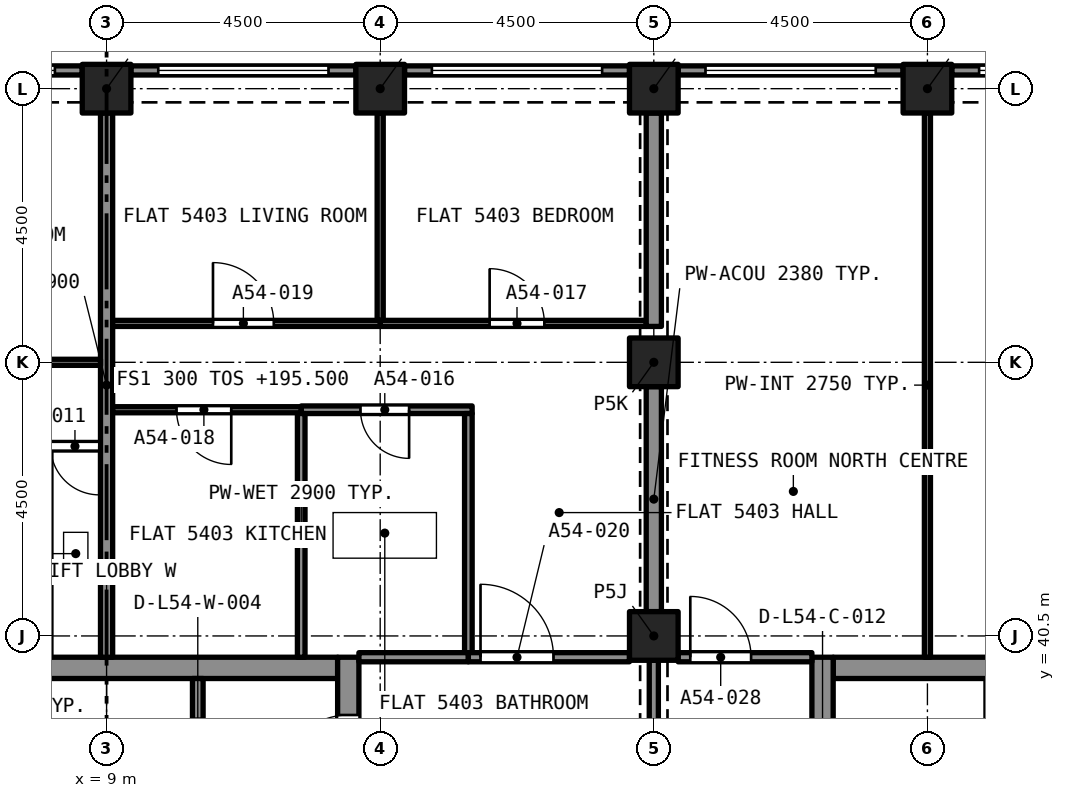
"""IFC4 building model, lengths in metres.
Left out: names, types, materials, properties, quantities, classifications, styles, units other than length and angle.
Written with IfcOpenShell. Run it as: python <this file> out.ifc"""

import sys

from ifc_helpers import new_model, si_unit, direction, frame, frame_2d, origin, origin_2d, place, context, subcontext, project, spatial, rectangle, extrude, element, fill, save


model = new_model("IFC4")
c1 = context("Model", 3, precision=1e-05, world=origin(), true_north=direction((0.0, 1.0)))
c2 = subcontext(c1, "Body", "Model", "MODEL_VIEW")
j1 = project(units=[si_unit("LENGTHUNIT", "METRE"), si_unit("PLANEANGLEUNIT", "RADIAN")], contexts=[c1])
p1 = place(None, origin())
s1 = spatial("IfcSite", under=j1, at=p1, CompositionType="ELEMENT")
p2 = place(p1, origin())
s2 = spatial("IfcBuilding", under=s1, at=p2, CompositionType="ELEMENT")
p3 = place(p2, frame((0.0, 0.0, 195.5)))
s3 = spatial("IfcBuildingStorey", under=s2, at=p3, CompositionType="ELEMENT", Elevation=195.5)
for number, where, z_axis, x_axis in (
    (1, (18.0, 40.5, 0.0), (0.0, 0.0, 1.0), (1.0, 0.0, 0.0)),
    (2, (18.0, 45.0, 0.0), (0.0, 0.0, 1.0), (1.0, 0.0, 0.0)),
    (3, (9.0, 49.5, 0.0), (0.0, 0.0, 1.0), (1.0, 0.0, 0.0)),
    (4, (13.5, 49.5, 0.0), (0.0, 0.0, 1.0), (1.0, 0.0, 0.0)),
    (5, (18.0, 49.5, 0.0), (0.0, 0.0, 1.0), (1.0, 0.0, 0.0)),
    (6, (22.5, 49.5, 0.0), (0.0, 0.0, 1.0), (1.0, 0.0, 0.0)),
):
    element("IfcColumn", number, at=place(p3, frame(where, z_axis=z_axis, x_axis=x_axis)), inside=s3, PredefinedType="COLUMN", context=c2, shape_type="SweptSolid", body=[
        extrude(rectangle(XDim=0.8, YDim=0.8, at=origin_2d()), origin(), (0.0, 0.0, 1.0), 3.2),
    ])
p4 = place(p3, frame((5.2, 39.975, 0.0), z_axis=(0.0, 0.0, 1.0), x_axis=(1.0, 0.0, 0.0)))
e7 = element("IfcWall", 7, at=p4, inside=s3, PredefinedType="SOLIDWALL", context=c2, shape_type="SweptSolid", body=[
    extrude(rectangle(XDim=7.6, YDim=0.35, at=frame_2d((3.8, 0.0))), origin(), (0.0, 0.0, 1.0), 3.2),
])
p5 = place(p3, frame((12.975, 27.35, 0.0), z_axis=(0.0, 0.0, 1.0), x_axis=(0.0, 1.0, 0.0)))
e8 = element("IfcWall", 8, at=p5, inside=s3, PredefinedType="SOLIDWALL", context=c2, shape_type="SweptSolid", body=[
    extrude(rectangle(XDim=12.8, YDim=0.35, at=frame_2d((6.4, 0.0))), origin(), (0.0, 0.0, 1.0), 3.2),
])
p6 = place(p5, frame((10.75, 0.0, 0.0)))
e9 = element("IfcOpeningElement", 9, at=p6, cuts=e8, PredefinedType="OPENING", context=c2, shape_type="SweptSolid", body=[
    extrude(rectangle(XDim=1.1, YDim=2.1, at=frame_2d((0.55, 1.05))), frame((0.0, 0.185, 0.0), z_axis=(0.0, -1.0, 0.0), x_axis=(1.0, 0.0, 0.0)), (0.0, 0.0, 1.0), 0.37),
])
p7 = place(p5, frame((8.6, 0.0, 0.0)))
e10 = element("IfcOpeningElement", 10, at=p7, cuts=e8, PredefinedType="OPENING", context=c2, shape_type="SweptSolid", body=[
    extrude(rectangle(XDim=1.2, YDim=2.1, at=frame_2d((0.6, 1.05))), frame((0.0, 0.185, 0.0), z_axis=(0.0, -1.0, 0.0), x_axis=(1.0, 0.0, 0.0)), (0.0, 0.0, 1.0), 0.37),
])
p8 = place(p3, frame((20.95, 39.975, 0.0), z_axis=(0.0, 0.0, 1.0), x_axis=(1.0, 0.0, 0.0)))
e11 = element("IfcWall", 11, at=p8, inside=s3, PredefinedType="SOLIDWALL", context=c2, shape_type="SweptSolid", body=[
    extrude(rectangle(XDim=7.6, YDim=0.35, at=frame_2d((3.8, 0.0))), origin(), (0.0, 0.0, 1.0), 3.2),
])
p9 = place(p3, frame((20.775, 27.35, 0.0), z_axis=(0.0, 0.0, 1.0), x_axis=(0.0, 1.0, 0.0)))
e12 = element("IfcWall", 12, at=p9, inside=s3, PredefinedType="SOLIDWALL", context=c2, shape_type="SweptSolid", body=[
    extrude(rectangle(XDim=12.8, YDim=0.35, at=frame_2d((6.4, 0.0))), origin(), (0.0, 0.0, 1.0), 3.2),
])
p10 = place(p9, frame((8.6, 0.0, 0.0)))
e13 = element("IfcOpeningElement", 13, at=p10, cuts=e12, PredefinedType="OPENING", context=c2, shape_type="SweptSolid", body=[
    extrude(rectangle(XDim=1.2, YDim=2.1, at=frame_2d((0.6, 1.05))), frame((0.0, 0.185, 0.0), z_axis=(0.0, -1.0, 0.0), x_axis=(1.0, 0.0, 0.0)), (0.0, 0.0, 1.0), 0.37),
])
p11 = place(p3, frame((22.9, 49.8, 0.0), z_axis=(0.0, 0.0, 1.0), x_axis=(1.0, 0.0, 0.0)))
e14 = element("IfcWall", 14, at=p11, inside=s3, PredefinedType="SOLIDWALL", context=c2, shape_type="SweptSolid", body=[
    extrude(rectangle(XDim=3.7, YDim=0.15, at=frame_2d((1.85, 0.0))), origin(), (0.0, 0.0, 1.0), 3.2),
])
p12 = place(p11, frame((0.45, 0.0, 0.45)))
e15 = element("IfcOpeningElement", 15, at=p12, cuts=e14, PredefinedType="OPENING", context=c2, shape_type="SweptSolid", body=[
    extrude(rectangle(XDim=2.8, YDim=1.95, at=frame_2d((1.4, 0.975))), frame((0.0, 0.085, 0.0), z_axis=(0.0, -1.0, 0.0), x_axis=(1.0, 0.0, 0.0)), (0.0, 0.0, 1.0), 0.17),
])
p13 = place(p3, frame((18.4, 49.8, 0.0), z_axis=(0.0, 0.0, 1.0), x_axis=(1.0, 0.0, 0.0)))
e16 = element("IfcWall", 16, at=p13, inside=s3, PredefinedType="SOLIDWALL", context=c2, shape_type="SweptSolid", body=[
    extrude(rectangle(XDim=3.7, YDim=0.15, at=frame_2d((1.85, 0.0))), origin(), (0.0, 0.0, 1.0), 3.2),
])
p14 = place(p13, frame((0.45, 0.0, 0.45)))
e17 = element("IfcOpeningElement", 17, at=p14, cuts=e16, PredefinedType="OPENING", context=c2, shape_type="SweptSolid", body=[
    extrude(rectangle(XDim=2.8, YDim=1.95, at=frame_2d((1.4, 0.975))), frame((0.0, 0.085, 0.0), z_axis=(0.0, -1.0, 0.0), x_axis=(1.0, 0.0, 0.0)), (0.0, 0.0, 1.0), 0.17),
])
p15 = place(p3, frame((13.9, 49.8, 0.0), z_axis=(0.0, 0.0, 1.0), x_axis=(1.0, 0.0, 0.0)))
e18 = element("IfcWall", 18, at=p15, inside=s3, PredefinedType="SOLIDWALL", context=c2, shape_type="SweptSolid", body=[
    extrude(rectangle(XDim=3.7, YDim=0.15, at=frame_2d((1.85, 0.0))), origin(), (0.0, 0.0, 1.0), 3.2),
])
p16 = place(p15, frame((0.45, 0.0, 0.45)))
e19 = element("IfcOpeningElement", 19, at=p16, cuts=e18, PredefinedType="OPENING", context=c2, shape_type="SweptSolid", body=[
    extrude(rectangle(XDim=2.8, YDim=1.95, at=frame_2d((1.4, 0.975))), frame((0.0, 0.085, 0.0), z_axis=(0.0, -1.0, 0.0), x_axis=(1.0, 0.0, 0.0)), (0.0, 0.0, 1.0), 0.17),
])
p17 = place(p3, frame((9.4, 49.8, 0.0), z_axis=(0.0, 0.0, 1.0), x_axis=(1.0, 0.0, 0.0)))
e20 = element("IfcWall", 20, at=p17, inside=s3, PredefinedType="SOLIDWALL", context=c2, shape_type="SweptSolid", body=[
    extrude(rectangle(XDim=3.7, YDim=0.15, at=frame_2d((1.85, 0.0))), origin(), (0.0, 0.0, 1.0), 3.2),
])
p18 = place(p17, frame((0.45, 0.0, 0.45)))
e21 = element("IfcOpeningElement", 21, at=p18, cuts=e20, PredefinedType="OPENING", context=c2, shape_type="SweptSolid", body=[
    extrude(rectangle(XDim=2.8, YDim=1.95, at=frame_2d((1.4, 0.975))), frame((0.0, 0.085, 0.0), z_axis=(0.0, -1.0, 0.0), x_axis=(1.0, 0.0, 0.0)), (0.0, 0.0, 1.0), 0.17),
])
p19 = place(p3, frame((4.9, 49.8, 0.0), z_axis=(0.0, 0.0, 1.0), x_axis=(1.0, 0.0, 0.0)))
e22 = element("IfcWall", 22, at=p19, inside=s3, PredefinedType="SOLIDWALL", context=c2, shape_type="SweptSolid", body=[
    extrude(rectangle(XDim=3.7, YDim=0.15, at=frame_2d((1.85, 0.0))), origin(), (0.0, 0.0, 1.0), 3.2),
])
p20 = place(p19, frame((0.45, 0.0, 0.45)))
e23 = element("IfcOpeningElement", 23, at=p20, cuts=e22, PredefinedType="OPENING", context=c2, shape_type="SweptSolid", body=[
    extrude(rectangle(XDim=2.8, YDim=1.95, at=frame_2d((1.4, 0.975))), frame((0.0, 0.085, 0.0), z_axis=(0.0, -1.0, 0.0), x_axis=(1.0, 0.0, 0.0)), (0.0, 0.0, 1.0), 0.17),
])
p21 = place(p3, frame((8.9, 43.62, 0.0), z_axis=(0.0, 0.0, 1.0), x_axis=(-1.0, 0.0, 0.0)))
e24 = element("IfcWall", 24, at=p21, inside=s3, PredefinedType="PARTITIONING", context=c2, shape_type="SweptSolid", body=[
    extrude(rectangle(XDim=0.877, YDim=0.125, at=frame_2d((0.438, 0.0))), origin(), (0.0, 0.0, 1.0), 2.9),
])
p22 = place(p21, frame((0.02, 0.0, 0.0)))
e25 = element("IfcOpeningElement", 25, at=p22, cuts=e24, PredefinedType="OPENING", context=c2, shape_type="SweptSolid", body=[
    extrude(rectangle(XDim=0.8, YDim=2.1, at=frame_2d((0.4, 1.05))), frame((0.0, 0.073, 0.0), z_axis=(0.0, -1.0, 0.0), x_axis=(1.0, 0.0, 0.0)), (0.0, 0.0, 1.0), 0.145),
])
p23 = place(p3, frame((9.0, 40.15, 0.0), z_axis=(0.0, 0.0, 1.0), x_axis=(0.0, 1.0, 0.0)))
e26 = element("IfcWall", 26, at=p23, inside=s3, PredefinedType="PARTITIONING", context=c2, shape_type="SweptSolid", body=[
    extrude(rectangle(XDim=8.95, YDim=0.2, at=frame_2d((4.475, 0.0))), origin(), (0.0, 0.0, 1.0), 2.9),
])
p24 = place(p3, frame((4.5, 45.0, 0.0), z_axis=(0.0, 0.0, 1.0), x_axis=(1.0, 0.0, 0.0)))
e27 = element("IfcWall", 27, at=p24, inside=s3, PredefinedType="PARTITIONING", context=c2, shape_type="SweptSolid", body=[
    extrude(rectangle(XDim=4.4, YDim=0.1, at=frame_2d((2.2, 0.0))), origin(), (0.0, 0.0, 1.0), 2.9),
])
p25 = place(p24, frame((1.8, 0.0, 0.0)))
e28 = element("IfcOpeningElement", 28, at=p25, cuts=e27, PredefinedType="OPENING", context=c2, shape_type="SweptSolid", body=[
    extrude(rectangle(XDim=0.9, YDim=2.1, at=frame_2d((0.45, 1.05))), frame((0.0, 0.06, 0.0), z_axis=(0.0, -1.0, 0.0), x_axis=(1.0, 0.0, 0.0)), (0.0, 0.0, 1.0), 0.12),
])
p26 = place(p3, frame((15.012, 44.22, 0.0), z_axis=(0.0, 0.0, 1.0), x_axis=(-1.0, 0.0, 0.0)))
e29 = element("IfcWall", 29, at=p26, inside=s3, PredefinedType="PARTITIONING", context=c2, shape_type="SweptSolid", body=[
    extrude(rectangle(XDim=2.812, YDim=0.125, at=frame_2d((1.406, 0.0))), origin(), (0.0, 0.0, 1.0), 2.9),
])
p27 = place(p26, frame((1.037, 0.0, 0.0)))
e30 = element("IfcOpeningElement", 30, at=p27, cuts=e29, PredefinedType="OPENING", context=c2, shape_type="SweptSolid", body=[
    extrude(rectangle(XDim=0.8, YDim=2.1, at=frame_2d((0.4, 1.05))), frame((0.0, 0.073, 0.0), z_axis=(0.0, -1.0, 0.0), x_axis=(1.0, 0.0, 0.0)), (0.0, 0.0, 1.0), 0.145),
])
p28 = place(p3, frame((14.95, 40.225, 0.0), z_axis=(0.0, 0.0, 1.0), x_axis=(0.0, 1.0, 0.0)))
e31 = element("IfcWall", 31, at=p28, inside=s3, PredefinedType="PARTITIONING", context=c2, shape_type="SweptSolid", body=[
    extrude(rectangle(XDim=3.932, YDim=0.125, at=frame_2d((1.966, 0.0))), origin(), (0.0, 0.0, 1.0), 2.9),
])
p29 = place(p3, frame((12.201, 40.15, 0.0), z_axis=(0.0, 0.0, 1.0), x_axis=(0.0, 1.0, 0.0)))
e32 = element("IfcWall", 32, at=p29, inside=s3, PredefinedType="PARTITIONING", context=c2, shape_type="SweptSolid", body=[
    extrude(rectangle(XDim=4.008, YDim=0.125, at=frame_2d((2.004, 0.0))), origin(), (0.0, 0.0, 1.0), 2.9),
])
p30 = place(p3, frame((13.15, 40.15, 0.0), z_axis=(0.0, 0.0, 1.0), x_axis=(1.0, 0.0, 0.0)))
e33 = element("IfcWall", 33, at=p30, inside=s3, PredefinedType="PARTITIONING", context=c2, shape_type="SweptSolid", body=[
    extrude(rectangle(XDim=1.8, YDim=0.15, at=frame_2d((0.9, 0.0))), origin(), (0.0, 0.0, 1.0), 2.9),
])
p31 = place(p3, frame((13.5, 45.64, 0.0), z_axis=(0.0, 0.0, 1.0), x_axis=(1.0, 0.0, 0.0)))
e34 = element("IfcWall", 34, at=p31, inside=s3, PredefinedType="PARTITIONING", context=c2, shape_type="SweptSolid", body=[
    extrude(rectangle(XDim=4.375, YDim=0.1, at=frame_2d((2.188, 0.0))), origin(), (0.0, 0.0, 1.0), 2.9),
])
p32 = place(p31, frame((1.8, 0.0, 0.0)))
e35 = element("IfcOpeningElement", 35, at=p32, cuts=e34, PredefinedType="OPENING", context=c2, shape_type="SweptSolid", body=[
    extrude(rectangle(XDim=0.9, YDim=2.1, at=frame_2d((0.45, 1.05))), frame((0.0, 0.06, 0.0), z_axis=(0.0, -1.0, 0.0), x_axis=(1.0, 0.0, 0.0)), (0.0, 0.0, 1.0), 0.12),
])
p33 = place(p3, frame((13.5, 45.69, 0.0), z_axis=(0.0, 0.0, 1.0), x_axis=(0.0, 1.0, 0.0)))
e36 = element("IfcWall", 36, at=p33, inside=s3, PredefinedType="PARTITIONING", context=c2, shape_type="SweptSolid", body=[
    extrude(rectangle(XDim=3.41, YDim=0.1, at=frame_2d((1.705, 0.0))), origin(), (0.0, 0.0, 1.0), 2.9),
])
p34 = place(p3, frame((18.0, 45.59, 0.0), z_axis=(0.0, 0.0, 1.0), x_axis=(0.0, 1.0, 0.0)))
e37 = element("IfcWall", 37, at=p34, inside=s3, PredefinedType="PARTITIONING", context=c2, shape_type="SweptSolid", body=[
    extrude(rectangle(XDim=3.51, YDim=0.25, at=frame_2d((1.755, 0.0))), origin(), (0.0, 0.0, 1.0), 2.38),
])
p35 = place(p3, frame((12.201, 44.22, 0.0), z_axis=(0.0, 0.0, 1.0), x_axis=(-1.0, 0.0, 0.0)))
e38 = element("IfcWall", 38, at=p35, inside=s3, PredefinedType="PARTITIONING", context=c2, shape_type="SweptSolid", body=[
    extrude(rectangle(XDim=3.101, YDim=0.1, at=frame_2d((1.55, 0.0))), origin(), (0.0, 0.0, 1.0), 2.9),
])
p36 = place(p35, frame((1.15, 0.0, 0.0)))
e39 = element("IfcOpeningElement", 39, at=p36, cuts=e38, PredefinedType="OPENING", context=c2, shape_type="SweptSolid", body=[
    extrude(rectangle(XDim=0.9, YDim=2.1, at=frame_2d((0.45, 1.05))), frame((0.0, 0.06, 0.0), z_axis=(0.0, -1.0, 0.0), x_axis=(1.0, 0.0, 0.0)), (0.0, 0.0, 1.0), 0.12),
])
p37 = place(p3, frame((9.1, 45.64, 0.0), z_axis=(0.0, 0.0, 1.0), x_axis=(1.0, 0.0, 0.0)))
e40 = element("IfcWall", 40, at=p37, inside=s3, PredefinedType="PARTITIONING", context=c2, shape_type="SweptSolid", body=[
    extrude(rectangle(XDim=4.4, YDim=0.1, at=frame_2d((2.2, 0.0))), origin(), (0.0, 0.0, 1.0), 2.9),
])
p38 = place(p37, frame((1.65, 0.0, 0.0)))
e41 = element("IfcOpeningElement", 41, at=p38, cuts=e40, PredefinedType="OPENING", context=c2, shape_type="SweptSolid", body=[
    extrude(rectangle(XDim=1.0, YDim=2.1, at=frame_2d((0.5, 1.05))), frame((0.0, 0.06, 0.0), z_axis=(0.0, -1.0, 0.0), x_axis=(1.0, 0.0, 0.0)), (0.0, 0.0, 1.0), 0.12),
])
p39 = place(p3, frame((18.0, 40.9, 0.0), z_axis=(0.0, 0.0, 1.0), x_axis=(0.0, 1.0, 0.0)))
e42 = element("IfcWall", 42, at=p39, inside=s3, PredefinedType="PARTITIONING", context=c2, shape_type="SweptSolid", body=[
    extrude(rectangle(XDim=3.7, YDim=0.25, at=frame_2d((1.85, 0.0))), origin(), (0.0, 0.0, 1.0), 2.38),
])
p40 = place(p3, frame((14.95, 40.15, 0.0), z_axis=(0.0, 0.0, 1.0), x_axis=(1.0, 0.0, 0.0)))
e43 = element("IfcWall", 43, at=p40, inside=s3, PredefinedType="PARTITIONING", context=c2, shape_type="SweptSolid", body=[
    extrude(rectangle(XDim=2.65, YDim=0.15, at=frame_2d((1.325, 0.0))), origin(), (0.0, 0.0, 1.0), 2.9),
])
p41 = place(p40, frame((0.2, 0.0, 0.0)))
e44 = element("IfcOpeningElement", 44, at=p41, cuts=e43, PredefinedType="OPENING", context=c2, shape_type="SweptSolid", body=[
    extrude(rectangle(XDim=1.2, YDim=2.4, at=frame_2d((0.6, 1.2))), frame((0.0, 0.085, 0.0), z_axis=(0.0, -1.0, 0.0), x_axis=(1.0, 0.0, 0.0)), (0.0, 0.0, 1.0), 0.17),
])
p42 = place(p3, frame((18.4, 40.15, 0.0), z_axis=(0.0, 0.0, 1.0), x_axis=(1.0, 0.0, 0.0)))
e45 = element("IfcWall", 45, at=p42, inside=s3, PredefinedType="PARTITIONING", context=c2, shape_type="SweptSolid", body=[
    extrude(rectangle(XDim=2.2, YDim=0.15, at=frame_2d((1.1, 0.0))), origin(), (0.0, 0.0, 1.0), 2.75),
])
p43 = place(p42, frame((0.2, 0.0, 0.0)))
e46 = element("IfcOpeningElement", 46, at=p43, cuts=e45, PredefinedType="OPENING", context=c2, shape_type="SweptSolid", body=[
    extrude(rectangle(XDim=1.0, YDim=2.1, at=frame_2d((0.5, 1.05))), frame((0.0, 0.085, 0.0), z_axis=(0.0, -1.0, 0.0), x_axis=(1.0, 0.0, 0.0)), (0.0, 0.0, 1.0), 0.17),
])
p44 = place(p3, frame((18.0, 40.1, 0.0), z_axis=(0.0, 0.0, 1.0), x_axis=(0.0, -1.0, 0.0)))
e47 = element("IfcWall", 47, at=p44, inside=s3, PredefinedType="PARTITIONING", context=c2, shape_type="SweptSolid", body=[
    extrude(rectangle(XDim=3.7, YDim=0.15, at=frame_2d((1.85, 0.0))), origin(), (0.0, 0.0, 1.0), 2.38),
])
p45 = place(p44, frame((1.25, 0.0, 0.0)))
e48 = element("IfcOpeningElement", 48, at=p45, cuts=e47, PredefinedType="OPENING", context=c2, shape_type="SweptSolid", body=[
    extrude(rectangle(XDim=1.2, YDim=2.1, at=frame_2d((0.6, 1.05))), frame((0.0, 0.085, 0.0), z_axis=(0.0, -1.0, 0.0), x_axis=(1.0, 0.0, 0.0)), (0.0, 0.0, 1.0), 0.17),
])
p46 = place(p3, frame((22.5, 40.15, 0.0), z_axis=(0.0, 0.0, 1.0), x_axis=(0.0, 1.0, 0.0)))
e49 = element("IfcWall", 49, at=p46, inside=s3, PredefinedType="PARTITIONING", context=c2, shape_type="SweptSolid", body=[
    extrude(rectangle(XDim=8.95, YDim=0.1, at=frame_2d((4.475, 0.0))), origin(), (0.0, 0.0, 1.0), 2.75),
])
p47 = place(p3, frame((10.5, 37.5, 0.0), z_axis=(0.0, 0.0, 1.0), x_axis=(0.0, 1.0, 0.0)))
e50 = element("IfcWall", 50, at=p47, inside=s3, PredefinedType="SOLIDWALL", context=c2, shape_type="SweptSolid", body=[
    extrude(rectangle(XDim=2.3, YDim=0.175, at=frame_2d((1.15, 0.0))), origin(), (0.0, 0.0, 1.0), 2.9),
])
p48 = place(p47, frame((0.65, 0.0, 0.0)))
e51 = element("IfcOpeningElement", 51, at=p48, cuts=e50, PredefinedType="OPENING", context=c2, shape_type="SweptSolid", body=[
    extrude(rectangle(XDim=1.0, YDim=2.1, at=frame_2d((0.5, 1.05))), frame((0.0, 0.097, 0.0), z_axis=(0.0, -1.0, 0.0), x_axis=(1.0, 0.0, 0.0)), (0.0, 0.0, 1.0), 0.195),
])
p49 = place(p12, origin())
e52 = element("IfcWindow", 52, at=p49, inside=s3, PartitioningType="SINGLE_PANEL", PredefinedType="WINDOW", context=c2, shape_type="SweptSolid", body=[
    extrude(rectangle(XDim=2.8, YDim=1.95, at=frame_2d((1.4, 0.975))), frame((0.0, 0.03, 0.0), z_axis=(0.0, -1.0, 0.0), x_axis=(1.0, 0.0, 0.0)), (0.0, 0.0, 1.0), 0.06),
])
fill(e15, e52)
p50 = place(p14, origin())
e53 = element("IfcWindow", 53, at=p50, inside=s3, PartitioningType="SINGLE_PANEL", PredefinedType="WINDOW", context=c2, shape_type="SweptSolid", body=[
    extrude(rectangle(XDim=2.8, YDim=1.95, at=frame_2d((1.4, 0.975))), frame((0.0, 0.03, 0.0), z_axis=(0.0, -1.0, 0.0), x_axis=(1.0, 0.0, 0.0)), (0.0, 0.0, 1.0), 0.06),
])
fill(e17, e53)
p51 = place(p16, origin())
e54 = element("IfcWindow", 54, at=p51, inside=s3, PartitioningType="SINGLE_PANEL", PredefinedType="WINDOW", context=c2, shape_type="SweptSolid", body=[
    extrude(rectangle(XDim=2.8, YDim=1.95, at=frame_2d((1.4, 0.975))), frame((0.0, 0.03, 0.0), z_axis=(0.0, -1.0, 0.0), x_axis=(1.0, 0.0, 0.0)), (0.0, 0.0, 1.0), 0.06),
])
fill(e19, e54)
p52 = place(p18, origin())
e55 = element("IfcWindow", 55, at=p52, inside=s3, PartitioningType="SINGLE_PANEL", PredefinedType="WINDOW", context=c2, shape_type="SweptSolid", body=[
    extrude(rectangle(XDim=2.8, YDim=1.95, at=frame_2d((1.4, 0.975))), frame((0.0, 0.03, 0.0), z_axis=(0.0, -1.0, 0.0), x_axis=(1.0, 0.0, 0.0)), (0.0, 0.0, 1.0), 0.06),
])
fill(e21, e55)
p53 = place(p20, origin())
e56 = element("IfcWindow", 56, at=p53, inside=s3, PartitioningType="SINGLE_PANEL", PredefinedType="WINDOW", context=c2, shape_type="SweptSolid", body=[
    extrude(rectangle(XDim=2.8, YDim=1.95, at=frame_2d((1.4, 0.975))), frame((0.0, 0.03, 0.0), z_axis=(0.0, -1.0, 0.0), x_axis=(1.0, 0.0, 0.0)), (0.0, 0.0, 1.0), 0.06),
])
fill(e23, e56)
p54 = place(p22, origin())
e57 = element("IfcDoor", 57, at=p54, inside=s3, OperationType="SINGLE_SWING_LEFT", PredefinedType="DOOR", context=c2, shape_type="SweptSolid", body=[
    extrude(rectangle(XDim=0.8, YDim=2.1, at=frame_2d((0.4, 1.05))), frame((0.0, 0.025, 0.0), z_axis=(0.0, -1.0, 0.0), x_axis=(1.0, 0.0, 0.0)), (0.0, 0.0, 1.0), 0.05),
])
fill(e25, e57)
p55 = place(p27, origin())
e58 = element("IfcDoor", 58, at=p55, inside=s3, OperationType="SINGLE_SWING_RIGHT", PredefinedType="DOOR", context=c2, shape_type="SweptSolid", body=[
    extrude(rectangle(XDim=0.8, YDim=2.1, at=frame_2d((0.4, 1.05))), frame((0.0, 0.025, 0.0), z_axis=(0.0, -1.0, 0.0), x_axis=(1.0, 0.0, 0.0)), (0.0, 0.0, 1.0), 0.05),
])
fill(e30, e58)
p56 = place(p32, origin())
e59 = element("IfcDoor", 59, at=p56, inside=s3, OperationType="SINGLE_SWING_RIGHT", PredefinedType="DOOR", context=c2, shape_type="SweptSolid", body=[
    extrude(rectangle(XDim=0.9, YDim=2.1, at=frame_2d((0.45, 1.05))), frame((0.0, 0.025, 0.0), z_axis=(0.0, -1.0, 0.0), x_axis=(1.0, 0.0, 0.0)), (0.0, 0.0, 1.0), 0.05),
])
fill(e35, e59)
p57 = place(p36, origin())
e60 = element("IfcDoor", 60, at=p57, inside=s3, OperationType="SINGLE_SWING_RIGHT", PredefinedType="DOOR", context=c2, shape_type="SweptSolid", body=[
    extrude(rectangle(XDim=0.9, YDim=2.1, at=frame_2d((0.45, 1.05))), frame((0.0, 0.025, 0.0), z_axis=(0.0, -1.0, 0.0), x_axis=(1.0, 0.0, 0.0)), (0.0, 0.0, 1.0), 0.05),
])
fill(e39, e60)
p58 = place(p38, origin())
e61 = element("IfcDoor", 61, at=p58, inside=s3, OperationType="SINGLE_SWING_LEFT", PredefinedType="DOOR", context=c2, shape_type="SweptSolid", body=[
    extrude(rectangle(XDim=1.0, YDim=2.1, at=frame_2d((0.5, 1.05))), frame((0.0, 0.025, 0.0), z_axis=(0.0, -1.0, 0.0), x_axis=(1.0, 0.0, 0.0)), (0.0, 0.0, 1.0), 0.05),
])
fill(e41, e61)
p59 = place(p41, origin())
e62 = element("IfcDoor", 62, at=p59, inside=s3, OperationType="SINGLE_SWING_LEFT", PredefinedType="DOOR", context=c2, shape_type="SweptSolid", body=[
    extrude(rectangle(XDim=1.2, YDim=2.4, at=frame_2d((0.6, 1.2))), frame((0.0, 0.025, 0.0), z_axis=(0.0, -1.0, 0.0), x_axis=(1.0, 0.0, 0.0)), (0.0, 0.0, 1.0), 0.05),
])
fill(e44, e62)
p60 = place(p43, origin())
e63 = element("IfcDoor", 63, at=p60, inside=s3, OperationType="SINGLE_SWING_LEFT", PredefinedType="DOOR", context=c2, shape_type="SweptSolid", body=[
    extrude(rectangle(XDim=1.0, YDim=2.1, at=frame_2d((0.5, 1.05))), frame((0.0, 0.025, 0.0), z_axis=(0.0, -1.0, 0.0), x_axis=(1.0, 0.0, 0.0)), (0.0, 0.0, 1.0), 0.05),
])
fill(e46, e63)
p61 = place(p6, origin())
e64 = element("IfcDoor", 64, at=p61, inside=s3, OperationType="SINGLE_SWING_LEFT", PredefinedType="DOOR", context=c2, shape_type="SweptSolid", body=[
    extrude(rectangle(XDim=1.1, YDim=2.1, at=frame_2d((0.55, 1.05))), frame((0.0, 0.025, 0.0), z_axis=(0.0, -1.0, 0.0), x_axis=(1.0, 0.0, 0.0)), (0.0, 0.0, 1.0), 0.05),
])
fill(e9, e64)
save(model, sys.argv[1])
